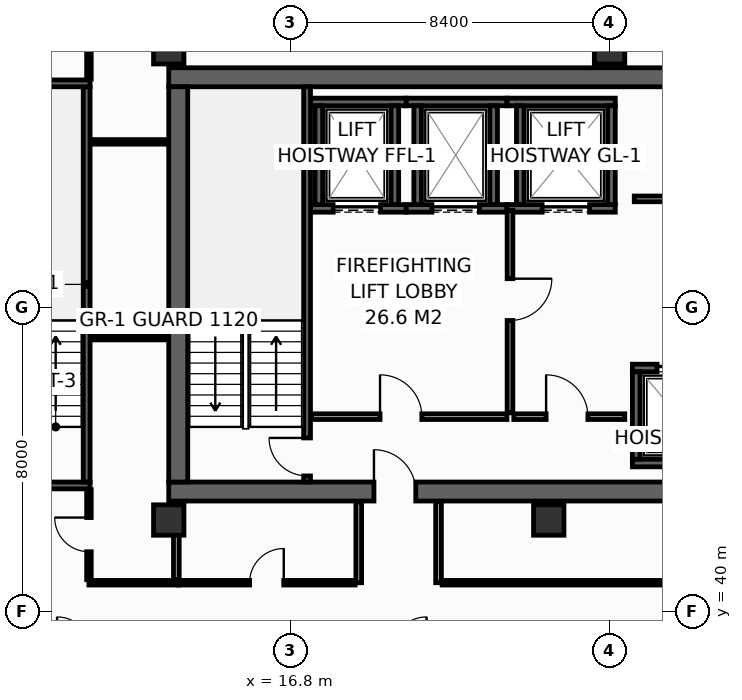
"""IFC4 building model, lengths in metres.
Left out: names, types, materials, properties, quantities, classifications, styles, units other than length and angle.
Written with IfcOpenShell. Run it as: python <this file> out.ifc"""

import sys

from ifc_helpers import new_model, si_unit, direction, frame, frame_2d, origin, origin_2d, place, context, subcontext, project, spatial, rectangle, hollow_rectangle, extrude, element, fill, save


model = new_model("IFC4")
c1 = context("Model", 3, precision=1e-05, world=origin(), true_north=direction((0.0, 1.0)))
c2 = subcontext(c1, "Body", "Model", "MODEL_VIEW")
j1 = project(units=[si_unit("LENGTHUNIT", "METRE"), si_unit("PLANEANGLEUNIT", "RADIAN")], contexts=[c1])
p1 = place(None, origin())
s1 = spatial("IfcSite", under=j1, at=p1, CompositionType="ELEMENT")
p2 = place(p1, origin())
s2 = spatial("IfcBuilding", under=s1, at=p2, CompositionType="ELEMENT")
p3 = place(p2, frame((0.0, 0.0, 217.0)))
s3 = spatial("IfcBuildingStorey", under=s2, at=p3, CompositionType="ELEMENT", Elevation=217.0)
p4 = place(p3, frame((13.6, 43.15, 0.0), z_axis=(0.0, 0.0, 1.0), x_axis=(1.0, 0.0, 0.0)))
e1 = element("IfcWall", 1, at=p4, inside=s3, PredefinedType="SHEAR", context=c2, shape_type="SweptSolid", body=[
    extrude(rectangle(XDim=32.7, YDim=0.5, at=frame_2d((16.35, 0.0))), origin(), (0.0, 0.0, 1.0), 3.55),
])
p5 = place(p4, frame((5.4, 0.0, 0.0)))
e2 = element("IfcOpeningElement", 2, at=p5, cuts=e1, PredefinedType="OPENING", context=c2, shape_type="SweptSolid", body=[
    extrude(rectangle(XDim=1.1, YDim=2.15, at=frame_2d((0.55, 1.075))), frame((0.0, 0.26, 0.0), z_axis=(0.0, -1.0, 0.0), x_axis=(1.0, 0.0, 0.0)), (0.0, 0.0, 1.0), 0.52),
])
p6 = place(p4, frame((25.6, 0.0, 0.0)))
e3 = element("IfcOpeningElement", 3, at=p6, cuts=e1, PredefinedType="OPENING", context=c2, shape_type="SweptSolid", body=[
    extrude(rectangle(XDim=1.1, YDim=2.15, at=frame_2d((0.55, 1.075))), frame((0.0, 0.26, 0.0), z_axis=(0.0, -1.0, 0.0), x_axis=(1.0, 0.0, 0.0)), (0.0, 0.0, 1.0), 0.52),
])
p7 = place(p3, frame((13.6, 54.05, 0.0), z_axis=(0.0, 0.0, 1.0), x_axis=(1.0, 0.0, 0.0)))
e4 = element("IfcWall", 4, at=p7, inside=s3, PredefinedType="SHEAR", context=c2, shape_type="SweptSolid", body=[
    extrude(rectangle(XDim=32.7, YDim=0.5, at=frame_2d((16.35, 0.0))), origin(), (0.0, 0.0, 1.0), 3.55),
])
p8 = place(p3, frame((13.85, 43.4, 0.0), z_axis=(0.0, 0.0, 1.0), x_axis=(0.0, 1.0, 0.0)))
e5 = element("IfcWall", 5, at=p8, inside=s3, PredefinedType="SHEAR", context=c2, shape_type="SweptSolid", body=[
    extrude(rectangle(XDim=10.4, YDim=0.5, at=frame_2d((5.2, 0.0))), origin(), (0.0, 0.0, 1.0), 3.55),
])
for number, where, z_axis, x_axis in (
    (6, (13.6, 54.8, 0.0), (0.0, 0.0, 1.0), (1.0, 0.0, 0.0)),
    (7, (25.2, 54.8, 0.0), (0.0, 0.0, 1.0), (1.0, 0.0, 0.0)),
    (8, (13.6, 42.4, 0.0), (0.0, 0.0, 1.0), (1.0, 0.0, 0.0)),
    (9, (23.6, 42.4, 0.0), (0.0, 0.0, 1.0), (1.0, 0.0, 0.0)),
):
    element("IfcColumn", number, at=place(p3, frame(where, z_axis=z_axis, x_axis=x_axis)), inside=s3, PredefinedType="COLUMN", context=c2, shape_type="SweptSolid", body=[
        extrude(hollow_rectangle(XDim=0.8, YDim=0.8, WallThickness=0.036, at=origin_2d()), origin(), (0.0, 0.0, 1.0), 3.8),
    ])
p9 = place(p3, frame((17.33, 50.6, 0.0), z_axis=(0.0, 0.0, 1.0), x_axis=(1.0, 0.0, 0.0)))
e10 = element("IfcWall", 10, at=p9, inside=s3, PredefinedType="SHEAR", context=c2, shape_type="SweptSolid", body=[
    extrude(rectangle(XDim=2.52, YDim=0.2, at=frame_2d((1.26, 0.0))), origin(), (0.0, 0.0, 1.0), 3.55),
])
p10 = place(p9, frame((0.595, 0.0, 0.0)))
e11 = element("IfcOpeningElement", 11, at=p10, cuts=e10, PredefinedType="OPENING", context=c2, shape_type="SweptSolid", body=[
    extrude(rectangle(XDim=1.25, YDim=2.3, at=frame_2d((0.625, 1.15))), frame((0.0, 0.11, 0.0), z_axis=(0.0, -1.0, 0.0), x_axis=(1.0, 0.0, 0.0)), (0.0, 0.0, 1.0), 0.22),
])
p11 = place(p3, frame((17.33, 53.4, 0.0), z_axis=(0.0, 0.0, 1.0), x_axis=(1.0, 0.0, 0.0)))
e12 = element("IfcWall", 12, at=p11, inside=s3, PredefinedType="SHEAR", context=c2, shape_type="SweptSolid", body=[
    extrude(rectangle(XDim=2.52, YDim=0.2, at=frame_2d((1.26, 0.0))), origin(), (0.0, 0.0, 1.0), 3.55),
])
for number, where, z_axis, x_axis in (
    (13, (17.55, 50.7, 0.0), (0.0, 0.0, 1.0), (0.0, 1.0, 0.0)),
    (14, (19.55, 50.7, 0.0), (0.0, 0.0, 1.0), (0.0, 1.0, 0.0)),
):
    element("IfcWall", number, at=place(p3, frame(where, z_axis=z_axis, x_axis=x_axis)), inside=s3, PredefinedType="SHEAR", context=c2, shape_type="SweptSolid", body=[
        extrude(rectangle(XDim=2.6, YDim=0.2, at=frame_2d((1.3, 0.0))), origin(), (0.0, 0.0, 1.0), 3.55),
    ])
p12 = place(p3, frame((19.85, 50.6, 0.0), z_axis=(0.0, 0.0, 1.0), x_axis=(1.0, 0.0, 0.0)))
e15 = element("IfcWall", 15, at=p12, inside=s3, PredefinedType="SHEAR", context=c2, shape_type="SweptSolid", body=[
    extrude(rectangle(XDim=2.65, YDim=0.2, at=frame_2d((1.325, 0.0))), origin(), (0.0, 0.0, 1.0), 3.55),
])
p13 = place(p12, frame((0.675, 0.0, 0.0)))
e16 = element("IfcOpeningElement", 16, at=p13, cuts=e15, PredefinedType="OPENING", context=c2, shape_type="SweptSolid", body=[
    extrude(rectangle(XDim=1.25, YDim=2.3, at=frame_2d((0.625, 1.15))), frame((0.0, 0.11, 0.0), z_axis=(0.0, -1.0, 0.0), x_axis=(1.0, 0.0, 0.0)), (0.0, 0.0, 1.0), 0.22),
])
p14 = place(p3, frame((19.85, 53.4, 0.0), z_axis=(0.0, 0.0, 1.0), x_axis=(1.0, 0.0, 0.0)))
e17 = element("IfcWall", 17, at=p14, inside=s3, PredefinedType="SHEAR", context=c2, shape_type="SweptSolid", body=[
    extrude(rectangle(XDim=2.65, YDim=0.2, at=frame_2d((1.325, 0.0))), origin(), (0.0, 0.0, 1.0), 3.55),
])
for number, where, z_axis, x_axis in (
    (18, (20.15, 50.7, 0.0), (0.0, 0.0, 1.0), (0.0, 1.0, 0.0)),
    (19, (22.15, 50.7, 0.0), (0.0, 0.0, 1.0), (0.0, 1.0, 0.0)),
):
    element("IfcWall", number, at=place(p3, frame(where, z_axis=z_axis, x_axis=x_axis)), inside=s3, PredefinedType="SHEAR", context=c2, shape_type="SweptSolid", body=[
        extrude(rectangle(XDim=2.6, YDim=0.2, at=frame_2d((1.3, 0.0))), origin(), (0.0, 0.0, 1.0), 3.55),
    ])
p15 = place(p3, frame((22.5, 50.6, 0.0), z_axis=(0.0, 0.0, 1.0), x_axis=(1.0, 0.0, 0.0)))
e20 = element("IfcWall", 20, at=p15, inside=s3, PredefinedType="SHEAR", context=c2, shape_type="SweptSolid", body=[
    extrude(rectangle(XDim=2.85, YDim=0.2, at=frame_2d((1.425, 0.0))), origin(), (0.0, 0.0, 1.0), 3.55),
])
p16 = place(p15, frame((0.925, 0.0, 0.0)))
e21 = element("IfcOpeningElement", 21, at=p16, cuts=e20, PredefinedType="OPENING", context=c2, shape_type="SweptSolid", body=[
    extrude(rectangle(XDim=1.25, YDim=2.3, at=frame_2d((0.625, 1.15))), frame((0.0, 0.11, 0.0), z_axis=(0.0, -1.0, 0.0), x_axis=(1.0, 0.0, 0.0)), (0.0, 0.0, 1.0), 0.22),
])
p17 = place(p3, frame((22.5, 53.4, 0.0), z_axis=(0.0, 0.0, 1.0), x_axis=(1.0, 0.0, 0.0)))
e22 = element("IfcWall", 22, at=p17, inside=s3, PredefinedType="SHEAR", context=c2, shape_type="SweptSolid", body=[
    extrude(rectangle(XDim=2.85, YDim=0.2, at=frame_2d((1.425, 0.0))), origin(), (0.0, 0.0, 1.0), 3.55),
])
for number, where, z_axis, x_axis in (
    (23, (22.85, 50.7, 0.0), (0.0, 0.0, 1.0), (0.0, 1.0, 0.0)),
    (24, (25.25, 50.7, 0.0), (0.0, 0.0, 1.0), (0.0, 1.0, 0.0)),
):
    element("IfcWall", number, at=place(p3, frame(where, z_axis=z_axis, x_axis=x_axis)), inside=s3, PredefinedType="SHEAR", context=c2, shape_type="SweptSolid", body=[
        extrude(rectangle(XDim=2.6, YDim=0.2, at=frame_2d((1.3, 0.0))), origin(), (0.0, 0.0, 1.0), 3.55),
    ])
p18 = place(p3, frame((25.8, 43.9, 0.0), z_axis=(0.0, 0.0, 1.0), x_axis=(1.0, 0.0, 0.0)))
e25 = element("IfcWall", 25, at=p18, inside=s3, PredefinedType="SHEAR", context=c2, shape_type="SweptSolid", body=[
    extrude(rectangle(XDim=2.575, YDim=0.2, at=frame_2d((1.288, 0.0))), origin(), (0.0, 0.0, 1.0), 3.55),
])
p19 = place(p3, frame((25.8, 46.4, 0.0), z_axis=(0.0, 0.0, 1.0), x_axis=(1.0, 0.0, 0.0)))
e26 = element("IfcWall", 26, at=p19, inside=s3, PredefinedType="SHEAR", context=c2, shape_type="SweptSolid", body=[
    extrude(rectangle(XDim=2.575, YDim=0.2, at=frame_2d((1.288, 0.0))), origin(), (0.0, 0.0, 1.0), 3.55),
])
p20 = place(p19, frame((0.65, 0.0, 0.0)))
e27 = element("IfcOpeningElement", 27, at=p20, cuts=e26, PredefinedType="OPENING", context=c2, shape_type="SweptSolid", body=[
    extrude(rectangle(XDim=1.1, YDim=2.2, at=frame_2d((0.55, 1.1))), frame((0.0, 0.11, 0.0), z_axis=(0.0, -1.0, 0.0), x_axis=(1.0, 0.0, 0.0)), (0.0, 0.0, 1.0), 0.22),
])
p21 = place(p3, frame((25.9, 44.0, 0.0), z_axis=(0.0, 0.0, 1.0), x_axis=(0.0, 1.0, 0.0)))
e28 = element("IfcWall", 28, at=p21, inside=s3, PredefinedType="SHEAR", context=c2, shape_type="SweptSolid", body=[
    extrude(rectangle(XDim=2.3, YDim=0.2, at=frame_2d((1.15, 0.0))), origin(), (0.0, 0.0, 1.0), 3.55),
])
p22 = place(p3, frame((17.24, 43.4, 0.0), z_axis=(0.0, 0.0, 1.0), x_axis=(0.0, 1.0, 0.0)))
e29 = element("IfcWall", 29, at=p22, inside=s3, PredefinedType="SHEAR", context=c2, shape_type="SweptSolid", body=[
    extrude(rectangle(XDim=10.4, YDim=0.18, at=frame_2d((5.2, 0.0))), origin(), (0.0, 0.0, 1.0), 3.55),
])
p23 = place(p22, frame((0.16, 0.0, 0.0)))
e30 = element("IfcOpeningElement", 30, at=p23, cuts=e29, PredefinedType="OPENING", context=c2, shape_type="SweptSolid", body=[
    extrude(rectangle(XDim=1.0, YDim=2.15, at=frame_2d((0.5, 1.075))), frame((0.0, 0.1, 0.0), z_axis=(0.0, -1.0, 0.0), x_axis=(1.0, 0.0, 0.0)), (0.0, 0.0, 1.0), 0.2),
])
p24 = place(p3, frame((8.12, 43.31, 0.0), z_axis=(0.0, 0.0, 1.0), x_axis=(1.0, 0.0, 0.0)))
e31 = element("IfcWall", 31, at=p24, inside=s3, PredefinedType="SHEAR", context=c2, shape_type="SweptSolid", body=[
    extrude(rectangle(XDim=3.41, YDim=0.18, at=frame_2d((1.705, 0.0))), origin(), (0.0, 0.0, 1.0), 3.55),
])
p25 = place(p24, frame((1.15, 0.0, 0.0)))
e32 = element("IfcOpeningElement", 32, at=p25, cuts=e31, PredefinedType="OPENING", context=c2, shape_type="SweptSolid", body=[
    extrude(rectangle(XDim=1.1, YDim=2.15, at=frame_2d((0.55, 1.075))), frame((0.0, 0.1, 0.0), z_axis=(0.0, -1.0, 0.0), x_axis=(1.0, 0.0, 0.0)), (0.0, 0.0, 1.0), 0.2),
])
p26 = place(p3, frame((11.44, 43.4, 0.0), z_axis=(0.0, 0.0, 1.0), x_axis=(0.0, 1.0, 0.0)))
e33 = element("IfcWall", 33, at=p26, inside=s3, PredefinedType="SHEAR", context=c2, shape_type="SweptSolid", body=[
    extrude(rectangle(XDim=10.4, YDim=0.18, at=frame_2d((5.2, 0.0))), origin(), (0.0, 0.0, 1.0), 3.55),
])
p27 = place(p3, frame((11.53, 53.89, 0.0), z_axis=(0.0, 0.0, 1.0), x_axis=(-1.0, 0.0, 0.0)))
e34 = element("IfcWall", 34, at=p27, inside=s3, PredefinedType="SHEAR", context=c2, shape_type="SweptSolid", body=[
    extrude(rectangle(XDim=3.41, YDim=0.18, at=frame_2d((1.705, 0.0))), origin(), (0.0, 0.0, 1.0), 3.55),
])
p28 = place(p3, frame((17.36, 45.12, 0.0), z_axis=(0.0, 0.0, 1.0), x_axis=(1.0, 0.0, 0.0)))
e35 = element("IfcWall", 35, at=p28, inside=s3, PredefinedType="PARTITIONING", context=c2, shape_type="SweptSolid", body=[
    extrude(rectangle(XDim=5.14, YDim=0.15, at=frame_2d((2.57, 0.0))), origin(), (0.0, 0.0, 1.0), 3.55),
])
p29 = place(p28, frame((1.8, 0.0, 0.0)))
e36 = element("IfcOpeningElement", 36, at=p29, cuts=e35, PredefinedType="OPENING", context=c2, shape_type="SweptSolid", body=[
    extrude(rectangle(XDim=1.1, YDim=2.15, at=frame_2d((0.55, 1.075))), frame((0.0, 0.085, 0.0), z_axis=(0.0, -1.0, 0.0), x_axis=(1.0, 0.0, 0.0)), (0.0, 0.0, 1.0), 0.17),
])
p30 = place(p3, frame((22.58, 50.55, 0.0), z_axis=(0.0, 0.0, 1.0), x_axis=(0.0, -1.0, 0.0)))
e37 = element("IfcWall", 37, at=p30, inside=s3, PredefinedType="PARTITIONING", context=c2, shape_type="SweptSolid", body=[
    extrude(rectangle(XDim=5.33, YDim=0.15, at=frame_2d((2.665, 0.0))), origin(), (0.0, 0.0, 1.0), 3.55),
])
p31 = place(p30, frame((1.8, 0.0, 0.0)))
e38 = element("IfcOpeningElement", 38, at=p31, cuts=e37, PredefinedType="OPENING", context=c2, shape_type="SweptSolid", body=[
    extrude(rectangle(XDim=1.1, YDim=2.15, at=frame_2d((0.55, 1.075))), frame((0.0, 0.085, 0.0), z_axis=(0.0, -1.0, 0.0), x_axis=(1.0, 0.0, 0.0)), (0.0, 0.0, 1.0), 0.17),
])
p32 = place(p3, frame((22.68, 45.12, 0.0), z_axis=(0.0, 0.0, 1.0), x_axis=(1.0, 0.0, 0.0)))
e39 = element("IfcWall", 39, at=p32, inside=s3, PredefinedType="PARTITIONING", context=c2, shape_type="SweptSolid", body=[
    extrude(rectangle(XDim=2.92, YDim=0.15, at=frame_2d((1.46, 0.0))), origin(), (0.0, 0.0, 1.0), 3.55),
])
p33 = place(p32, frame((0.85, 0.0, 0.0)))
e40 = element("IfcOpeningElement", 40, at=p33, cuts=e39, PredefinedType="OPENING", context=c2, shape_type="SweptSolid", body=[
    extrude(rectangle(XDim=1.1, YDim=2.15, at=frame_2d((0.55, 1.075))), frame((0.0, 0.085, 0.0), z_axis=(0.0, -1.0, 0.0), x_axis=(1.0, 0.0, 0.0)), (0.0, 0.0, 1.0), 0.17),
])
p34 = place(p3, frame((25.85, 50.85, 0.0), z_axis=(0.0, 0.0, 1.0), x_axis=(1.0, 0.0, 0.0)))
e41 = element("IfcWall", 41, at=p34, inside=s3, PredefinedType="PARTITIONING", context=c2, shape_type="SweptSolid", body=[
    extrude(rectangle(XDim=7.65, YDim=0.15, at=frame_2d((3.825, 0.0))), origin(), (0.0, 0.0, 1.0), 3.55),
])
p35 = place(p34, frame((1.25, 0.0, 0.0)))
e42 = element("IfcOpeningElement", 42, at=p35, cuts=e41, PredefinedType="OPENING", context=c2, shape_type="SweptSolid", body=[
    extrude(rectangle(XDim=0.95, YDim=2.15, at=frame_2d((0.475, 1.075))), frame((0.0, 0.085, 0.0), z_axis=(0.0, -1.0, 0.0), x_axis=(1.0, 0.0, 0.0)), (0.0, 0.0, 1.0), 0.17),
])
p36 = place(p3, frame((11.5, 40.75, 0.0), z_axis=(0.0, 0.0, 1.0), x_axis=(1.0, 0.0, 0.0)))
e43 = element("IfcWall", 43, at=p36, inside=s3, PredefinedType="PARTITIONING", context=c2, shape_type="SweptSolid", body=[
    extrude(rectangle(XDim=2.35, YDim=0.12, at=frame_2d((1.175, 0.0))), origin(), (0.0, 0.0, 1.0), 3.55),
])
p37 = place(p3, frame((11.55, 52.35, 0.0), z_axis=(0.0, 0.0, 1.0), x_axis=(1.0, 0.0, 0.0)))
e44 = element("IfcWall", 44, at=p37, inside=s3, PredefinedType="PARTITIONING", context=c2, shape_type="SweptSolid", body=[
    extrude(rectangle(XDim=2.03, YDim=0.12, at=frame_2d((1.015, 0.0))), origin(), (0.0, 0.0, 1.0), 3.55),
])
p38 = place(p3, frame((11.5, 54.0, 0.0), z_axis=(0.0, 0.0, 1.0), x_axis=(0.0, 1.0, 0.0)))
e45 = element("IfcWall", 45, at=p38, inside=s3, PredefinedType="PARTITIONING", context=c2, shape_type="SweptSolid", body=[
    extrude(rectangle(XDim=1.995, YDim=0.12, at=frame_2d((0.998, 0.0))), origin(), (0.0, 0.0, 1.0), 2.935),
])
p39 = place(p3, frame((11.55, 47.2, 0.0), z_axis=(0.0, 0.0, 1.0), x_axis=(1.0, 0.0, 0.0)))
e46 = element("IfcWall", 46, at=p39, inside=s3, PredefinedType="PARTITIONING", context=c2, shape_type="SweptSolid", body=[
    extrude(rectangle(XDim=2.03, YDim=0.12, at=frame_2d((1.015, 0.0))), origin(), (0.0, 0.0, 1.0), 3.55),
])
p40 = place(p3, frame((11.5, 40.83, 0.0), z_axis=(0.0, 0.0, 1.0), x_axis=(0.0, 1.0, 0.0)))
e47 = element("IfcWall", 47, at=p40, inside=s3, PredefinedType="PARTITIONING", context=c2, shape_type="SweptSolid", body=[
    extrude(rectangle(XDim=2.37, YDim=0.12, at=frame_2d((1.185, 0.0))), origin(), (0.0, 0.0, 1.0), 2.835),
])
p41 = place(p40, frame((0.735, 0.0, 0.0)))
e48 = element("IfcOpeningElement", 48, at=p41, cuts=e47, PredefinedType="OPENING", context=c2, shape_type="SweptSolid", body=[
    extrude(rectangle(XDim=0.9, YDim=2.1, at=frame_2d((0.45, 1.05))), frame((0.0, 0.07, 0.0), z_axis=(0.0, -1.0, 0.0), x_axis=(1.0, 0.0, 0.0)), (0.0, 0.0, 1.0), 0.14),
])
p42 = place(p3, frame((13.8, 40.83, 0.0), z_axis=(0.0, 0.0, 1.0), x_axis=(0.0, 1.0, 0.0)))
e49 = element("IfcWall", 49, at=p42, inside=s3, PredefinedType="PARTITIONING", context=c2, shape_type="SweptSolid", body=[
    extrude(rectangle(XDim=2.05, YDim=0.15, at=frame_2d((1.025, 0.0))), origin(), (0.0, 0.0, 1.0), 3.55),
])
for number, where, z_axis, x_axis in (
    (50, (18.6, 40.75, 0.0), (0.0, 0.0, 1.0), (0.0, 1.0, 0.0)),
    (51, (20.7, 40.75, 0.0), (0.0, 0.0, 1.0), (0.0, 1.0, 0.0)),
):
    element("IfcWall", number, at=place(p3, frame(where, z_axis=z_axis, x_axis=x_axis)), inside=s3, PredefinedType="PARTITIONING", context=c2, shape_type="SweptSolid", body=[
        extrude(rectangle(XDim=2.13, YDim=0.15, at=frame_2d((1.065, 0.0))), origin(), (0.0, 0.0, 1.0), 3.55),
    ])
p43 = place(p3, frame((13.85, 40.75, 0.0), z_axis=(0.0, 0.0, 1.0), x_axis=(1.0, 0.0, 0.0)))
e52 = element("IfcWall", 52, at=p43, inside=s3, PredefinedType="PARTITIONING", context=c2, shape_type="SweptSolid", body=[
    extrude(rectangle(XDim=4.655, YDim=0.12, at=frame_2d((2.327, 0.0))), origin(), (0.0, 0.0, 1.0), 3.55),
])
p44 = place(p43, frame((1.877, 0.0, 0.0)))
e53 = element("IfcOpeningElement", 53, at=p44, cuts=e52, PredefinedType="OPENING", context=c2, shape_type="SweptSolid", body=[
    extrude(rectangle(XDim=0.9, YDim=2.1, at=frame_2d((0.45, 1.05))), frame((0.0, 0.07, 0.0), z_axis=(0.0, -1.0, 0.0), x_axis=(1.0, 0.0, 0.0)), (0.0, 0.0, 1.0), 0.14),
])
p45 = place(p3, frame((20.795, 40.75, 0.0), z_axis=(0.0, 0.0, 1.0), x_axis=(1.0, 0.0, 0.0)))
e54 = element("IfcWall", 54, at=p45, inside=s3, PredefinedType="PARTITIONING", context=c2, shape_type="SweptSolid", body=[
    extrude(rectangle(XDim=17.91, YDim=0.12, at=frame_2d((8.955, 0.0))), origin(), (0.0, 0.0, 1.0), 2.835),
])
p46 = place(p45, frame((8.505, 0.0, 0.0)))
e55 = element("IfcOpeningElement", 55, at=p46, cuts=e54, PredefinedType="OPENING", context=c2, shape_type="SweptSolid", body=[
    extrude(rectangle(XDim=0.9, YDim=2.1, at=frame_2d((0.45, 1.05))), frame((0.0, 0.07, 0.0), z_axis=(0.0, -1.0, 0.0), x_axis=(1.0, 0.0, 0.0)), (0.0, 0.0, 1.0), 0.14),
])
p47 = place(p10, origin())
e56 = element("IfcDoor", 56, at=p47, inside=s3, OperationType="SLIDING_TO_LEFT", PredefinedType="DOOR", context=c2, shape_type="SweptSolid", body=[
    extrude(rectangle(XDim=1.25, YDim=2.3, at=frame_2d((0.625, 1.15))), frame((0.0, 0.025, 0.0), z_axis=(0.0, -1.0, 0.0), x_axis=(1.0, 0.0, 0.0)), (0.0, 0.0, 1.0), 0.05),
])
fill(e11, e56)
p48 = place(p13, origin())
e57 = element("IfcDoor", 57, at=p48, inside=s3, OperationType="SLIDING_TO_LEFT", PredefinedType="DOOR", context=c2, shape_type="SweptSolid", body=[
    extrude(rectangle(XDim=1.25, YDim=2.3, at=frame_2d((0.625, 1.15))), frame((0.0, 0.025, 0.0), z_axis=(0.0, -1.0, 0.0), x_axis=(1.0, 0.0, 0.0)), (0.0, 0.0, 1.0), 0.05),
])
fill(e16, e57)
p49 = place(p16, origin())
e58 = element("IfcDoor", 58, at=p49, inside=s3, OperationType="SLIDING_TO_LEFT", PredefinedType="DOOR", context=c2, shape_type="SweptSolid", body=[
    extrude(rectangle(XDim=1.25, YDim=2.3, at=frame_2d((0.625, 1.15))), frame((0.0, 0.025, 0.0), z_axis=(0.0, -1.0, 0.0), x_axis=(1.0, 0.0, 0.0)), (0.0, 0.0, 1.0), 0.05),
])
fill(e21, e58)
p50 = place(p20, origin())
e59 = element("IfcDoor", 59, at=p50, inside=s3, OperationType="SLIDING_TO_LEFT", PredefinedType="DOOR", context=c2, shape_type="SweptSolid", body=[
    extrude(rectangle(XDim=1.1, YDim=2.2, at=frame_2d((0.55, 1.1))), frame((0.0, 0.025, 0.0), z_axis=(0.0, -1.0, 0.0), x_axis=(1.0, 0.0, 0.0)), (0.0, 0.0, 1.0), 0.05),
])
fill(e27, e59)
p51 = place(p23, origin())
e60 = element("IfcDoor", 60, at=p51, inside=s3, OperationType="SINGLE_SWING_RIGHT", PredefinedType="DOOR", context=c2, shape_type="SweptSolid", body=[
    extrude(rectangle(XDim=1.0, YDim=2.15, at=frame_2d((0.5, 1.075))), frame((0.0, 0.025, 0.0), z_axis=(0.0, -1.0, 0.0), x_axis=(1.0, 0.0, 0.0)), (0.0, 0.0, 1.0), 0.05),
])
fill(e30, e60)
p52 = place(p29, origin())
e61 = element("IfcDoor", 61, at=p52, inside=s3, OperationType="SINGLE_SWING_LEFT", PredefinedType="DOOR", context=c2, shape_type="SweptSolid", body=[
    extrude(rectangle(XDim=1.1, YDim=2.15, at=frame_2d((0.55, 1.075))), frame((0.0, 0.025, 0.0), z_axis=(0.0, -1.0, 0.0), x_axis=(1.0, 0.0, 0.0)), (0.0, 0.0, 1.0), 0.05),
])
fill(e36, e61)
p53 = place(p31, origin())
e62 = element("IfcDoor", 62, at=p53, inside=s3, OperationType="SINGLE_SWING_LEFT", PredefinedType="DOOR", context=c2, shape_type="SweptSolid", body=[
    extrude(rectangle(XDim=1.1, YDim=2.15, at=frame_2d((0.55, 1.075))), frame((0.0, 0.025, 0.0), z_axis=(0.0, -1.0, 0.0), x_axis=(1.0, 0.0, 0.0)), (0.0, 0.0, 1.0), 0.05),
])
fill(e38, e62)
p54 = place(p33, origin())
e63 = element("IfcDoor", 63, at=p54, inside=s3, OperationType="SINGLE_SWING_LEFT", PredefinedType="DOOR", context=c2, shape_type="SweptSolid", body=[
    extrude(rectangle(XDim=1.1, YDim=2.15, at=frame_2d((0.55, 1.075))), frame((0.0, 0.025, 0.0), z_axis=(0.0, -1.0, 0.0), x_axis=(1.0, 0.0, 0.0)), (0.0, 0.0, 1.0), 0.05),
])
fill(e40, e63)
p55 = place(p5, origin())
e64 = element("IfcDoor", 64, at=p55, inside=s3, OperationType="SINGLE_SWING_LEFT", PredefinedType="DOOR", context=c2, shape_type="SweptSolid", body=[
    extrude(rectangle(XDim=1.1, YDim=2.15, at=frame_2d((0.55, 1.075))), frame((0.0, 0.025, 0.0), z_axis=(0.0, -1.0, 0.0), x_axis=(1.0, 0.0, 0.0)), (0.0, 0.0, 1.0), 0.05),
])
fill(e2, e64)
p56 = place(p41, origin())
e65 = element("IfcDoor", 65, at=p56, inside=s3, OperationType="SINGLE_SWING_RIGHT", PredefinedType="DOOR", context=c2, shape_type="SweptSolid", body=[
    extrude(rectangle(XDim=0.9, YDim=2.1, at=frame_2d((0.45, 1.05))), frame((0.0, 0.025, 0.0), z_axis=(0.0, -1.0, 0.0), x_axis=(1.0, 0.0, 0.0)), (0.0, 0.0, 1.0), 0.05),
])
fill(e48, e65)
p57 = place(p44, origin())
e66 = element("IfcDoor", 66, at=p57, inside=s3, OperationType="SINGLE_SWING_RIGHT", PredefinedType="DOOR", context=c2, shape_type="SweptSolid", body=[
    extrude(rectangle(XDim=0.9, YDim=2.1, at=frame_2d((0.45, 1.05))), frame((0.0, 0.025, 0.0), z_axis=(0.0, -1.0, 0.0), x_axis=(1.0, 0.0, 0.0)), (0.0, 0.0, 1.0), 0.05),
])
fill(e53, e66)
save(model, sys.argv[1])
